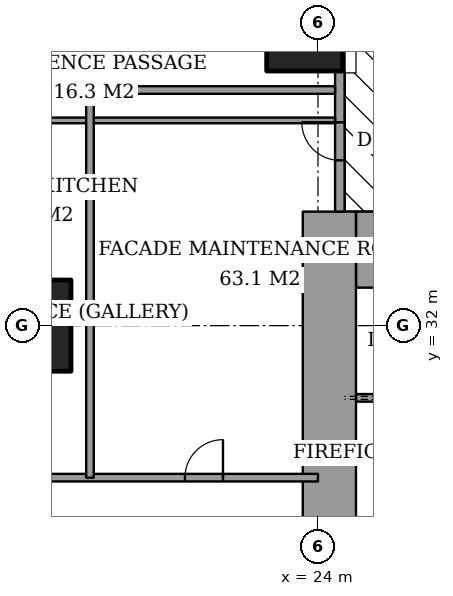
"""IFC4 building model, lengths in metres.
Left out: names, types, materials, properties, quantities, classifications, styles, units other than length and angle.
Written with IfcOpenShell. Run it as: python <this file> out.ifc"""

import sys

from ifc_helpers import new_model, si_unit, direction, frame, frame_2d, origin, origin_2d, place, context, subcontext, project, spatial, rectangle, extrude, element, fill, save


model = new_model("IFC4")
c1 = context("Model", 3, precision=1e-05, world=origin(), true_north=direction((0.0, 1.0)))
c2 = subcontext(c1, "Body", "Model", "MODEL_VIEW")
j1 = project(units=[si_unit("LENGTHUNIT", "METRE"), si_unit("PLANEANGLEUNIT", "RADIAN")], contexts=[c1])
p1 = place(None, origin())
s1 = spatial("IfcSite", under=j1, at=p1, CompositionType="ELEMENT")
p2 = place(p1, origin())
s2 = spatial("IfcBuilding", under=s1, at=p2, CompositionType="ELEMENT")
p3 = place(p2, frame((0.0, 0.0, 182.2)))
s3 = spatial("IfcBuildingStorey", under=s2, at=p3, CompositionType="ELEMENT", Elevation=182.2)
p4 = place(p3, frame((16.0, 32.0, 0.0), z_axis=(0.0, 0.0, 1.0), x_axis=(1.0, 0.0, 0.0)))
e1 = element("IfcColumn", 1, at=p4, inside=s3, PredefinedType="COLUMN", context=c2, shape_type="SweptSolid", body=[
    extrude(rectangle(XDim=3.0, YDim=2.4, at=origin_2d()), origin(), (0.0, 0.0, 1.0), 3.6),
])
p5 = place(p3, frame((23.65, 40.0, 0.0), z_axis=(0.0, 0.0, 1.0), x_axis=(1.0, 0.0, 0.0)))
e2 = element("IfcColumn", 2, at=p5, inside=s3, PredefinedType="COLUMN", context=c2, shape_type="SweptSolid", body=[
    extrude(rectangle(XDim=2.0, YDim=2.6, at=origin_2d()), origin(), (0.0, 0.0, 1.0), 3.6),
])
p6 = place(p3, frame((25.0, 34.0, 0.0), z_axis=(0.0, 0.0, 1.0), x_axis=(1.0, 0.0, 0.0)))
e3 = element("IfcWall", 3, at=p6, inside=s3, PredefinedType="SHEAR", context=c2, shape_type="SweptSolid", body=[
    extrude(rectangle(XDim=3.15, YDim=2.0, at=frame_2d((1.575, 0.0))), origin(), (0.0, 0.0, 1.0), 3.6),
])
p7 = place(p3, frame((24.3, 23.15, 0.0), z_axis=(0.0, 0.0, 1.0), x_axis=(0.0, 1.0, 0.0)))
e4 = element("IfcWall", 4, at=p7, inside=s3, PredefinedType="SHEAR", context=c2, shape_type="SweptSolid", body=[
    extrude(rectangle(XDim=11.85, YDim=1.4, at=frame_2d((5.925, 0.0))), origin(), (0.0, 0.0, 1.0), 3.6),
])
p8 = place(p7, frame((0.75, 0.0, 0.0)))
e5 = element("IfcOpeningElement", 5, at=p8, cuts=e4, PredefinedType="OPENING", context=c2, shape_type="SweptSolid", body=[
    extrude(rectangle(XDim=1.8, YDim=2.4, at=frame_2d((0.9, 1.2))), frame((0.0, 0.71, 0.0), z_axis=(0.0, -1.0, 0.0), x_axis=(1.0, 0.0, 0.0)), (0.0, 0.0, 1.0), 1.42),
])
p9 = place(p3, frame((24.575, 35.0, 0.0), z_axis=(0.0, 0.0, 1.0), x_axis=(0.0, 1.0, 0.0)))
e6 = element("IfcWall", 6, at=p9, inside=s3, PredefinedType="SOLIDWALL", context=c2, shape_type="SweptSolid", body=[
    extrude(rectangle(XDim=3.7, YDim=0.25, at=frame_2d((1.85, 0.0))), origin(), (0.0, 0.0, 1.0), 3.6),
])
p10 = place(p9, frame((1.35, 0.0, 0.0)))
e7 = element("IfcOpeningElement", 7, at=p10, cuts=e6, PredefinedType="OPENING", context=c2, shape_type="SweptSolid", body=[
    extrude(rectangle(XDim=1.0, YDim=2.1, at=frame_2d((0.5, 1.05))), frame((0.0, 0.135, 0.0), z_axis=(0.0, -1.0, 0.0), x_axis=(1.0, 0.0, 0.0)), (0.0, 0.0, 1.0), 0.27),
])
p11 = place(p3, frame((6.725, 28.0, 0.0), z_axis=(0.0, 0.0, 1.0), x_axis=(1.0, 0.0, 0.0)))
e8 = element("IfcWall", 8, at=p11, inside=s3, PredefinedType="PARTITIONING", context=c2, shape_type="SweptSolid", body=[
    extrude(rectangle(XDim=17.275, YDim=0.2, at=frame_2d((8.637, 0.0))), origin(), (0.0, 0.0, 1.0), 3.35),
])
p12 = place(p11, frame((6.675, 0.0, 0.0)))
e9 = element("IfcOpeningElement", 9, at=p12, cuts=e8, PredefinedType="OPENING", context=c2, shape_type="SweptSolid", body=[
    extrude(rectangle(XDim=1.2, YDim=2.4, at=frame_2d((0.6, 1.2))), frame((0.0, 0.11, 0.0), z_axis=(0.0, -1.0, 0.0), x_axis=(1.0, 0.0, 0.0)), (0.0, 0.0, 1.0), 0.22),
])
p13 = place(p11, frame((13.775, 0.0, 0.0)))
e10 = element("IfcOpeningElement", 10, at=p13, cuts=e8, PredefinedType="OPENING", context=c2, shape_type="SweptSolid", body=[
    extrude(rectangle(XDim=1.0, YDim=2.1, at=frame_2d((0.5, 1.05))), frame((0.0, 0.11, 0.0), z_axis=(0.0, -1.0, 0.0), x_axis=(1.0, 0.0, 0.0)), (0.0, 0.0, 1.0), 0.22),
])
p14 = place(p3, frame((17.5, 32.1, 0.0), z_axis=(0.0, 0.0, 1.0), x_axis=(1.0, 0.0, 0.0)))
e11 = element("IfcWall", 11, at=p14, inside=s3, PredefinedType="PARTITIONING", context=c2, shape_type="SweptSolid", body=[
    extrude(rectangle(XDim=0.5, YDim=0.15, at=frame_2d((0.25, 0.0))), origin(), (0.0, 0.0, 1.0), 2.634),
])
p15 = place(p3, frame((-0.45, 37.4, 0.0), z_axis=(0.0, 0.0, 1.0), x_axis=(1.0, 0.0, 0.0)))
e12 = element("IfcWall", 12, at=p15, inside=s3, PredefinedType="PARTITIONING", context=c2, shape_type="SweptSolid", body=[
    extrude(rectangle(XDim=24.9, YDim=0.15, at=frame_2d((12.45, 0.0))), origin(), (0.0, 0.0, 1.0), 3.35),
])
p16 = place(p15, frame((13.25, 0.0, 0.0)))
e13 = element("IfcOpeningElement", 13, at=p16, cuts=e12, PredefinedType="OPENING", context=c2, shape_type="SweptSolid", body=[
    extrude(rectangle(XDim=1.0, YDim=2.1, at=frame_2d((0.5, 1.05))), frame((0.0, 0.085, 0.0), z_axis=(0.0, -1.0, 0.0), x_axis=(1.0, 0.0, 0.0)), (0.0, 0.0, 1.0), 0.17),
])
p17 = place(p15, frame((3.087, 0.0, 0.0)))
e14 = element("IfcOpeningElement", 14, at=p17, cuts=e12, PredefinedType="OPENING", context=c2, shape_type="SweptSolid", body=[
    extrude(rectangle(XDim=1.0, YDim=2.1, at=frame_2d((0.5, 1.05))), frame((0.0, 0.085, 0.0), z_axis=(0.0, -1.0, 0.0), x_axis=(1.0, 0.0, 0.0)), (0.0, 0.0, 1.0), 0.17),
])
p18 = place(p15, frame((8.363, 0.0, 0.0)))
e15 = element("IfcOpeningElement", 15, at=p18, cuts=e12, PredefinedType="OPENING", context=c2, shape_type="SweptSolid", body=[
    extrude(rectangle(XDim=0.9, YDim=2.1, at=frame_2d((0.45, 1.05))), frame((0.0, 0.085, 0.0), z_axis=(0.0, -1.0, 0.0), x_axis=(1.0, 0.0, 0.0)), (0.0, 0.0, 1.0), 0.17),
])
p19 = place(p15, frame((11.05, 0.0, 0.0)))
e16 = element("IfcOpeningElement", 16, at=p19, cuts=e12, PredefinedType="OPENING", context=c2, shape_type="SweptSolid", body=[
    extrude(rectangle(XDim=1.0, YDim=2.1, at=frame_2d((0.5, 1.05))), frame((0.0, 0.085, 0.0), z_axis=(0.0, -1.0, 0.0), x_axis=(1.0, 0.0, 0.0)), (0.0, 0.0, 1.0), 0.17),
])
p20 = place(p15, frame((16.15, 0.0, 0.0)))
e17 = element("IfcOpeningElement", 17, at=p20, cuts=e12, PredefinedType="OPENING", context=c2, shape_type="SweptSolid", body=[
    extrude(rectangle(XDim=1.0, YDim=2.1, at=frame_2d((0.5, 1.05))), frame((0.0, 0.085, 0.0), z_axis=(0.0, -1.0, 0.0), x_axis=(1.0, 0.0, 0.0)), (0.0, 0.0, 1.0), 0.17),
])
p21 = place(p3, frame((18.0, 38.2, 0.0), z_axis=(0.0, 0.0, 1.0), x_axis=(1.0, 0.0, 0.0)))
e18 = element("IfcWall", 18, at=p21, inside=s3, PredefinedType="PARTITIONING", context=c2, shape_type="SweptSolid", body=[
    extrude(rectangle(XDim=6.45, YDim=0.2, at=frame_2d((3.225, 0.0))), origin(), (0.0, 0.0, 1.0), 3.35),
])
p22 = place(p3, frame((18.0, 28.0, 0.0), z_axis=(0.0, 0.0, 1.0), x_axis=(0.0, 1.0, 0.0)))
e19 = element("IfcWall", 19, at=p22, inside=s3, PredefinedType="PARTITIONING", context=c2, shape_type="SweptSolid", body=[
    extrude(rectangle(XDim=10.2, YDim=0.2, at=frame_2d((5.1, 0.0))), origin(), (0.0, 0.0, 1.0), 3.35),
])
p23 = place(p3, frame((25.0, 30.1, 0.0), z_axis=(0.0, 0.0, 1.0), x_axis=(1.0, 0.0, 0.0)))
e20 = element("IfcWall", 20, at=p23, inside=s3, PredefinedType="PARTITIONING", context=c2, shape_type="SweptSolid", body=[
    extrude(rectangle(XDim=12.7, YDim=0.2, at=frame_2d((6.35, 0.0))), origin(), (0.0, 0.0, 1.0), 3.6),
])
p24 = place(p23, frame((4.25, 0.0, 0.0)))
e21 = element("IfcOpeningElement", 21, at=p24, cuts=e20, PredefinedType="OPENING", context=c2, shape_type="SweptSolid", body=[
    extrude(rectangle(XDim=1.1, YDim=2.1, at=frame_2d((0.55, 1.05))), frame((0.0, 0.11, 0.0), z_axis=(0.0, -1.0, 0.0), x_axis=(1.0, 0.0, 0.0)), (0.0, 0.0, 1.0), 0.22),
])
p25 = place(p23, frame((7.45, 0.0, 0.0)))
e22 = element("IfcOpeningElement", 22, at=p25, cuts=e20, PredefinedType="OPENING", context=c2, shape_type="SweptSolid", body=[
    extrude(rectangle(XDim=1.1, YDim=2.1, at=frame_2d((0.55, 1.05))), frame((0.0, 0.11, 0.0), z_axis=(0.0, -1.0, 0.0), x_axis=(1.0, 0.0, 0.0)), (0.0, 0.0, 1.0), 0.22),
])
p26 = place(p23, frame((10.65, 0.0, 0.0)))
e23 = element("IfcOpeningElement", 23, at=p26, cuts=e20, PredefinedType="OPENING", context=c2, shape_type="SweptSolid", body=[
    extrude(rectangle(XDim=1.1, YDim=2.1, at=frame_2d((0.55, 1.05))), frame((0.0, 0.11, 0.0), z_axis=(0.0, -1.0, 0.0), x_axis=(1.0, 0.0, 0.0)), (0.0, 0.0, 1.0), 0.22),
])
p27 = place(p23, frame((0.9, 0.0, 0.0)))
e24 = element("IfcOpeningElement", 24, at=p27, cuts=e20, PredefinedType="OPENING", context=c2, shape_type="SweptSolid", body=[
    extrude(rectangle(XDim=1.2, YDim=2.1, at=frame_2d((0.6, 1.05))), frame((0.0, 0.11, 0.0), z_axis=(0.0, -1.0, 0.0), x_axis=(1.0, 0.0, 0.0)), (0.0, 0.0, 1.0), 0.22),
])
p28 = place(p10, origin())
e25 = element("IfcDoor", 25, at=p28, inside=s3, OperationType="SINGLE_SWING_LEFT", PredefinedType="DOOR", context=c2, shape_type="SweptSolid", body=[
    extrude(rectangle(XDim=1.0, YDim=2.1, at=frame_2d((0.5, 1.05))), frame((0.0, 0.025, 0.0), z_axis=(0.0, -1.0, 0.0), x_axis=(1.0, 0.0, 0.0)), (0.0, 0.0, 1.0), 0.05),
])
fill(e7, e25)
p29 = place(p13, origin())
e26 = element("IfcDoor", 26, at=p29, inside=s3, OperationType="SINGLE_SWING_LEFT", PredefinedType="DOOR", context=c2, shape_type="SweptSolid", body=[
    extrude(rectangle(XDim=1.0, YDim=2.1, at=frame_2d((0.5, 1.05))), frame((0.0, 0.025, 0.0), z_axis=(0.0, -1.0, 0.0), x_axis=(1.0, 0.0, 0.0)), (0.0, 0.0, 1.0), 0.05),
])
fill(e10, e26)
save(model, sys.argv[1])
